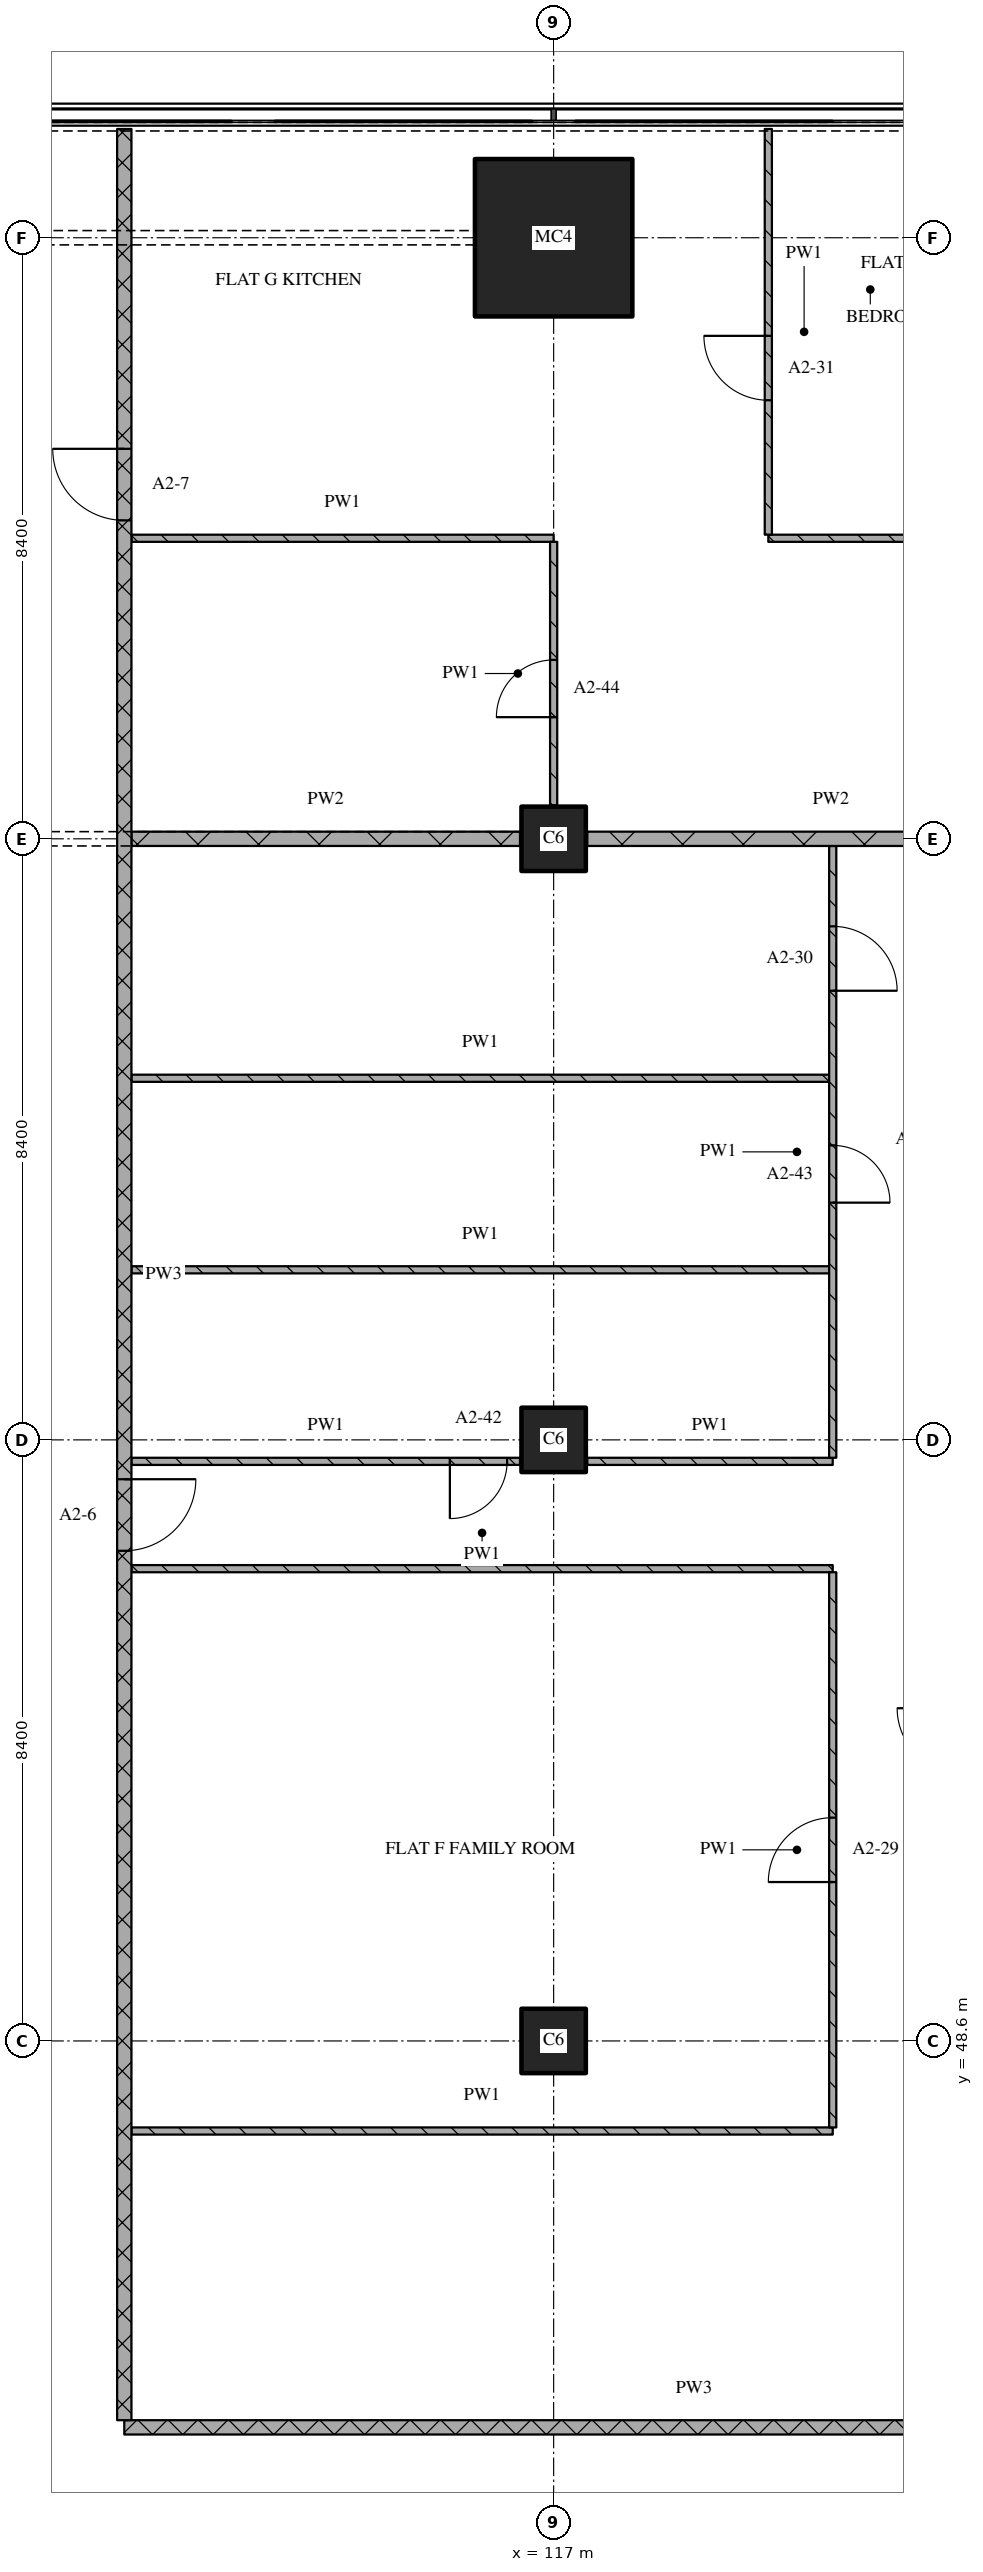
"""IFC4 building model, lengths in metres.
Left out: names, types, materials, properties, quantities, classifications, styles, units other than length and angle.
Written with IfcOpenShell. Run it as: python <this file> out.ifc"""

import sys

from ifc_helpers import new_model, si_unit, direction, frame, frame_2d, origin, origin_2d, place, context, subcontext, project, spatial, rectangle, extrude, element, fill, save


model = new_model("IFC4")
c1 = context("Model", 3, precision=1e-05, world=origin(), true_north=direction((0.0, 1.0)))
c2 = subcontext(c1, "Body", "Model", "MODEL_VIEW")
j1 = project(units=[si_unit("LENGTHUNIT", "METRE"), si_unit("PLANEANGLEUNIT", "RADIAN")], contexts=[c1])
p1 = place(None, origin())
s1 = spatial("IfcSite", under=j1, at=p1, CompositionType="ELEMENT")
p2 = place(p1, origin())
s2 = spatial("IfcBuilding", under=s1, at=p2, CompositionType="ELEMENT")
p3 = place(p2, frame((0.0, 0.0, 48.0)))
s3 = spatial("IfcBuildingStorey", under=s2, at=p3, CompositionType="ELEMENT", Elevation=48.0)
for number, where, z_axis, x_axis in (
    (1, (117.0, 48.6, 0.0), (0.0, 0.0, 1.0), (1.0, 0.0, 0.0)),
    (2, (117.0, 57.0, 0.0), (0.0, 0.0, 1.0), (1.0, 0.0, 0.0)),
    (3, (117.0, 65.4, 0.0), (0.0, 0.0, 1.0), (1.0, 0.0, 0.0)),
):
    element("IfcColumn", number, at=place(p3, frame(where, z_axis=z_axis, x_axis=x_axis)), inside=s3, PredefinedType="COLUMN", context=c2, shape_type="SweptSolid", body=[
        extrude(rectangle(XDim=0.9, YDim=0.9, at=origin_2d()), origin(), (0.0, 0.0, 1.0), 3.6),
    ])
p4 = place(p3, frame((117.0, 73.8, 0.0), z_axis=(0.0, 0.0, 1.0), x_axis=(1.0, 0.0, 0.0)))
e4 = element("IfcColumn", 4, at=p4, inside=s3, PredefinedType="COLUMN", context=c2, shape_type="SweptSolid", body=[
    extrude(rectangle(XDim=2.2, YDim=2.2, at=origin_2d()), origin(), (0.0, 0.0, 1.0), 3.6),
])
p5 = place(p3, frame((111.0, 43.2, 0.0), z_axis=(0.0, 0.0, 1.0), x_axis=(1.0, 0.0, 0.0)))
e5 = element("IfcWall", 5, at=p5, inside=s3, PredefinedType="PARTITIONING", context=c2, shape_type="SweptSolid", body=[
    extrude(rectangle(XDim=15.92, YDim=0.2, at=frame_2d((7.96, 0.0))), origin(), (0.0, 0.0, 1.0), 3.32),
])
for number, where, z_axis, x_axis in (
    (6, (111.1, 47.341, 0.0), (0.0, 0.0, 1.0), (1.0, 0.0, 0.0)),
    (7, (111.1, 55.2, 0.0), (0.0, 0.0, 1.0), (1.0, 0.0, 0.0)),
):
    element("IfcWall", number, at=place(p3, frame(where, z_axis=z_axis, x_axis=x_axis)), inside=s3, PredefinedType="PARTITIONING", context=c2, shape_type="SweptSolid", body=[
        extrude(rectangle(XDim=9.8, YDim=0.1, at=frame_2d((4.9, 0.0))), origin(), (0.0, 0.0, 1.0), 3.32),
    ])
p6 = place(p3, frame((111.1, 56.7, 0.0), z_axis=(0.0, 0.0, 1.0), x_axis=(1.0, 0.0, 0.0)))
e8 = element("IfcWall", 8, at=p6, inside=s3, PredefinedType="PARTITIONING", context=c2, shape_type="SweptSolid", body=[
    extrude(rectangle(XDim=5.43, YDim=0.1, at=frame_2d((2.715, 0.0))), origin(), (0.0, 0.0, 1.0), 3.32),
])
p7 = place(p6, frame((4.45, 0.0, 0.0)))
e9 = element("IfcOpeningElement", 9, at=p7, cuts=e8, PredefinedType="OPENING", context=c2, shape_type="SweptSolid", body=[
    extrude(rectangle(XDim=0.8, YDim=2.1, at=frame_2d((0.4, 1.05))), frame((0.0, 0.06, 0.0), z_axis=(0.0, -1.0, 0.0), x_axis=(1.0, 0.0, 0.0)), (0.0, 0.0, 1.0), 0.12),
])
p8 = place(p3, frame((117.47, 56.7, 0.0), z_axis=(0.0, 0.0, 1.0), x_axis=(1.0, 0.0, 0.0)))
e10 = element("IfcWall", 10, at=p8, inside=s3, PredefinedType="PARTITIONING", context=c2, shape_type="SweptSolid", body=[
    extrude(rectangle(XDim=3.43, YDim=0.1, at=frame_2d((1.715, 0.0))), origin(), (0.0, 0.0, 1.0), 3.32),
])
for number, where, z_axis, x_axis in (
    (11, (111.1, 59.377, 0.0), (0.0, 0.0, 1.0), (1.0, 0.0, 0.0)),
    (12, (111.1, 62.053, 0.0), (0.0, 0.0, 1.0), (1.0, 0.0, 0.0)),
):
    element("IfcWall", number, at=place(p3, frame(where, z_axis=z_axis, x_axis=x_axis)), inside=s3, PredefinedType="PARTITIONING", context=c2, shape_type="SweptSolid", body=[
        extrude(rectangle(XDim=9.75, YDim=0.1, at=frame_2d((4.875, 0.0))), origin(), (0.0, 0.0, 1.0), 3.32),
    ])
p9 = place(p3, frame((111.1, 65.4, 0.0), z_axis=(0.0, 0.0, 1.0), x_axis=(1.0, 0.0, 0.0)))
e13 = element("IfcWall", 13, at=p9, inside=s3, PredefinedType="PARTITIONING", context=c2, shape_type="SweptSolid", body=[
    extrude(rectangle(XDim=5.43, YDim=0.2, at=frame_2d((2.715, 0.0))), origin(), (0.0, 0.0, 1.0), 2.82),
])
p10 = place(p3, frame((117.47, 65.4, 0.0), z_axis=(0.0, 0.0, 1.0), x_axis=(1.0, 0.0, 0.0)))
e14 = element("IfcWall", 14, at=p10, inside=s3, PredefinedType="PARTITIONING", context=c2, shape_type="SweptSolid", body=[
    extrude(rectangle(XDim=6.81, YDim=0.2, at=frame_2d((3.405, 0.0))), origin(), (0.0, 0.0, 1.0), 3.32),
])
p11 = place(p3, frame((111.1, 69.6, 0.0), z_axis=(0.0, 0.0, 1.0), x_axis=(1.0, 0.0, 0.0)))
e15 = element("IfcWall", 15, at=p11, inside=s3, PredefinedType="PARTITIONING", context=c2, shape_type="SweptSolid", body=[
    extrude(rectangle(XDim=5.9, YDim=0.1, at=frame_2d((2.95, 0.0))), origin(), (0.0, 0.0, 1.0), 3.32),
])
p12 = place(p3, frame((120.0, 69.6, 0.0), z_axis=(0.0, 0.0, 1.0), x_axis=(1.0, 0.0, 0.0)))
e16 = element("IfcWall", 16, at=p12, inside=s3, PredefinedType="PARTITIONING", context=c2, shape_type="SweptSolid", body=[
    extrude(rectangle(XDim=6.92, YDim=0.1, at=frame_2d((3.46, 0.0))), origin(), (0.0, 0.0, 1.0), 3.32),
])
p13 = place(p3, frame((111.0, 75.32, 0.0), z_axis=(0.0, 0.0, 1.0), x_axis=(0.0, -1.0, 0.0)))
e17 = element("IfcWall", 17, at=p13, inside=s3, PredefinedType="PARTITIONING", context=c2, shape_type="SweptSolid", body=[
    extrude(rectangle(XDim=32.02, YDim=0.2, at=frame_2d((16.01, 0.0))), origin(), (0.0, 0.0, 1.0), 3.32),
])
p14 = place(p13, frame((4.47, 0.0, 0.0)))
e18 = element("IfcOpeningElement", 18, at=p14, cuts=e17, PredefinedType="OPENING", context=c2, shape_type="SweptSolid", body=[
    extrude(rectangle(XDim=1.0, YDim=2.1, at=frame_2d((0.5, 1.05))), frame((0.0, 0.11, 0.0), z_axis=(0.0, -1.0, 0.0), x_axis=(1.0, 0.0, 0.0)), (0.0, 0.0, 1.0), 0.22),
])
p15 = place(p13, frame((18.87, 0.0, 0.0)))
e19 = element("IfcOpeningElement", 19, at=p15, cuts=e17, PredefinedType="OPENING", context=c2, shape_type="SweptSolid", body=[
    extrude(rectangle(XDim=1.0, YDim=2.1, at=frame_2d((0.5, 1.05))), frame((0.0, 0.11, 0.0), z_axis=(0.0, -1.0, 0.0), x_axis=(1.0, 0.0, 0.0)), (0.0, 0.0, 1.0), 0.22),
])
p16 = place(p3, frame((117.0, 65.87, 0.0), z_axis=(0.0, 0.0, 1.0), x_axis=(0.0, 1.0, 0.0)))
e20 = element("IfcWall", 20, at=p16, inside=s3, PredefinedType="PARTITIONING", context=c2, shape_type="SweptSolid", body=[
    extrude(rectangle(XDim=3.68, YDim=0.1, at=frame_2d((1.84, 0.0))), origin(), (0.0, 0.0, 1.0), 3.32),
])
p17 = place(p16, frame((1.23, 0.0, 0.0)))
e21 = element("IfcOpeningElement", 21, at=p17, cuts=e20, PredefinedType="OPENING", context=c2, shape_type="SweptSolid", body=[
    extrude(rectangle(XDim=0.8, YDim=2.1, at=frame_2d((0.4, 1.05))), frame((0.0, 0.06, 0.0), z_axis=(0.0, -1.0, 0.0), x_axis=(1.0, 0.0, 0.0)), (0.0, 0.0, 1.0), 0.12),
])
p18 = place(p3, frame((120.0, 75.32, 0.0), z_axis=(0.0, 0.0, 1.0), x_axis=(0.0, -1.0, 0.0)))
e22 = element("IfcWall", 22, at=p18, inside=s3, PredefinedType="PARTITIONING", context=c2, shape_type="SweptSolid", body=[
    extrude(rectangle(XDim=5.67, YDim=0.1, at=frame_2d((2.835, 0.0))), origin(), (0.0, 0.0, 1.0), 3.32),
])
p19 = place(p18, frame((2.891, 0.0, 0.0)))
e23 = element("IfcOpeningElement", 23, at=p19, cuts=e22, PredefinedType="OPENING", context=c2, shape_type="SweptSolid", body=[
    extrude(rectangle(XDim=0.9, YDim=2.1, at=frame_2d((0.45, 1.05))), frame((0.0, 0.06, 0.0), z_axis=(0.0, -1.0, 0.0), x_axis=(1.0, 0.0, 0.0)), (0.0, 0.0, 1.0), 0.12),
])
p20 = place(p3, frame((120.9, 47.391, 0.0), z_axis=(0.0, 0.0, 1.0), x_axis=(0.0, 1.0, 0.0)))
e24 = element("IfcWall", 24, at=p20, inside=s3, PredefinedType="PARTITIONING", context=c2, shape_type="SweptSolid", body=[
    extrude(rectangle(XDim=7.759, YDim=0.1, at=frame_2d((3.879, 0.0))), origin(), (0.0, 0.0, 1.0), 3.32),
])
p21 = place(p20, frame((3.429, 0.0, 0.0)))
e25 = element("IfcOpeningElement", 25, at=p21, cuts=e24, PredefinedType="OPENING", context=c2, shape_type="SweptSolid", body=[
    extrude(rectangle(XDim=0.9, YDim=2.1, at=frame_2d((0.45, 1.05))), frame((0.0, 0.06, 0.0), z_axis=(0.0, -1.0, 0.0), x_axis=(1.0, 0.0, 0.0)), (0.0, 0.0, 1.0), 0.12),
])
p22 = place(p3, frame((120.9, 56.75, 0.0), z_axis=(0.0, 0.0, 1.0), x_axis=(0.0, 1.0, 0.0)))
e26 = element("IfcWall", 26, at=p22, inside=s3, PredefinedType="PARTITIONING", context=c2, shape_type="SweptSolid", body=[
    extrude(rectangle(XDim=8.55, YDim=0.1, at=frame_2d((4.275, 0.0))), origin(), (0.0, 0.0, 1.0), 3.32),
])
p23 = place(p22, frame((3.565, 0.0, 0.0)))
e27 = element("IfcOpeningElement", 27, at=p23, cuts=e26, PredefinedType="OPENING", context=c2, shape_type="SweptSolid", body=[
    extrude(rectangle(XDim=0.8, YDim=2.1, at=frame_2d((0.4, 1.05))), frame((0.0, 0.06, 0.0), z_axis=(0.0, -1.0, 0.0), x_axis=(1.0, 0.0, 0.0)), (0.0, 0.0, 1.0), 0.12),
])
p24 = place(p22, frame((6.527, 0.0, 0.0)))
e28 = element("IfcOpeningElement", 28, at=p24, cuts=e26, PredefinedType="OPENING", context=c2, shape_type="SweptSolid", body=[
    extrude(rectangle(XDim=0.9, YDim=2.1, at=frame_2d((0.45, 1.05))), frame((0.0, 0.06, 0.0), z_axis=(0.0, -1.0, 0.0), x_axis=(1.0, 0.0, 0.0)), (0.0, 0.0, 1.0), 0.12),
])
p25 = place(p7, origin())
e29 = element("IfcDoor", 29, at=p25, inside=s3, OperationType="SINGLE_SWING_RIGHT", PredefinedType="DOOR", context=c2, shape_type="SweptSolid", body=[
    extrude(rectangle(XDim=0.8, YDim=2.1, at=frame_2d((0.4, 1.05))), frame((0.0, 0.025, 0.0), z_axis=(0.0, -1.0, 0.0), x_axis=(1.0, 0.0, 0.0)), (0.0, 0.0, 1.0), 0.05),
])
fill(e9, e29)
p26 = place(p14, origin())
e30 = element("IfcDoor", 30, at=p26, inside=s3, OperationType="SINGLE_SWING_RIGHT", PredefinedType="DOOR", context=c2, shape_type="SweptSolid", body=[
    extrude(rectangle(XDim=1.0, YDim=2.1, at=frame_2d((0.5, 1.05))), frame((0.0, 0.025, 0.0), z_axis=(0.0, -1.0, 0.0), x_axis=(1.0, 0.0, 0.0)), (0.0, 0.0, 1.0), 0.05),
])
fill(e18, e30)
p27 = place(p15, origin())
e31 = element("IfcDoor", 31, at=p27, inside=s3, OperationType="SINGLE_SWING_LEFT", PredefinedType="DOOR", context=c2, shape_type="SweptSolid", body=[
    extrude(rectangle(XDim=1.0, YDim=2.1, at=frame_2d((0.5, 1.05))), frame((0.0, 0.025, 0.0), z_axis=(0.0, -1.0, 0.0), x_axis=(1.0, 0.0, 0.0)), (0.0, 0.0, 1.0), 0.05),
])
fill(e19, e31)
p28 = place(p17, origin())
e32 = element("IfcDoor", 32, at=p28, inside=s3, OperationType="SINGLE_SWING_LEFT", PredefinedType="DOOR", context=c2, shape_type="SweptSolid", body=[
    extrude(rectangle(XDim=0.8, YDim=2.1, at=frame_2d((0.4, 1.05))), frame((0.0, 0.025, 0.0), z_axis=(0.0, -1.0, 0.0), x_axis=(1.0, 0.0, 0.0)), (0.0, 0.0, 1.0), 0.05),
])
fill(e21, e32)
p29 = place(p19, origin())
e33 = element("IfcDoor", 33, at=p29, inside=s3, OperationType="SINGLE_SWING_RIGHT", PredefinedType="DOOR", context=c2, shape_type="SweptSolid", body=[
    extrude(rectangle(XDim=0.9, YDim=2.1, at=frame_2d((0.45, 1.05))), frame((0.0, 0.025, 0.0), z_axis=(0.0, -1.0, 0.0), x_axis=(1.0, 0.0, 0.0)), (0.0, 0.0, 1.0), 0.05),
])
fill(e23, e33)
p30 = place(p21, origin())
e34 = element("IfcDoor", 34, at=p30, inside=s3, OperationType="SINGLE_SWING_LEFT", PredefinedType="DOOR", context=c2, shape_type="SweptSolid", body=[
    extrude(rectangle(XDim=0.9, YDim=2.1, at=frame_2d((0.45, 1.05))), frame((0.0, 0.025, 0.0), z_axis=(0.0, -1.0, 0.0), x_axis=(1.0, 0.0, 0.0)), (0.0, 0.0, 1.0), 0.05),
])
fill(e25, e34)
p31 = place(p23, origin())
e35 = element("IfcDoor", 35, at=p31, inside=s3, OperationType="SINGLE_SWING_RIGHT", PredefinedType="DOOR", context=c2, shape_type="SweptSolid", body=[
    extrude(rectangle(XDim=0.8, YDim=2.1, at=frame_2d((0.4, 1.05))), frame((0.0, 0.025, 0.0), z_axis=(0.0, -1.0, 0.0), x_axis=(1.0, 0.0, 0.0)), (0.0, 0.0, 1.0), 0.05),
])
fill(e27, e35)
p32 = place(p24, origin())
e36 = element("IfcDoor", 36, at=p32, inside=s3, OperationType="SINGLE_SWING_RIGHT", PredefinedType="DOOR", context=c2, shape_type="SweptSolid", body=[
    extrude(rectangle(XDim=0.9, YDim=2.1, at=frame_2d((0.45, 1.05))), frame((0.0, 0.025, 0.0), z_axis=(0.0, -1.0, 0.0), x_axis=(1.0, 0.0, 0.0)), (0.0, 0.0, 1.0), 0.05),
])
fill(e28, e36)
save(model, sys.argv[1])
